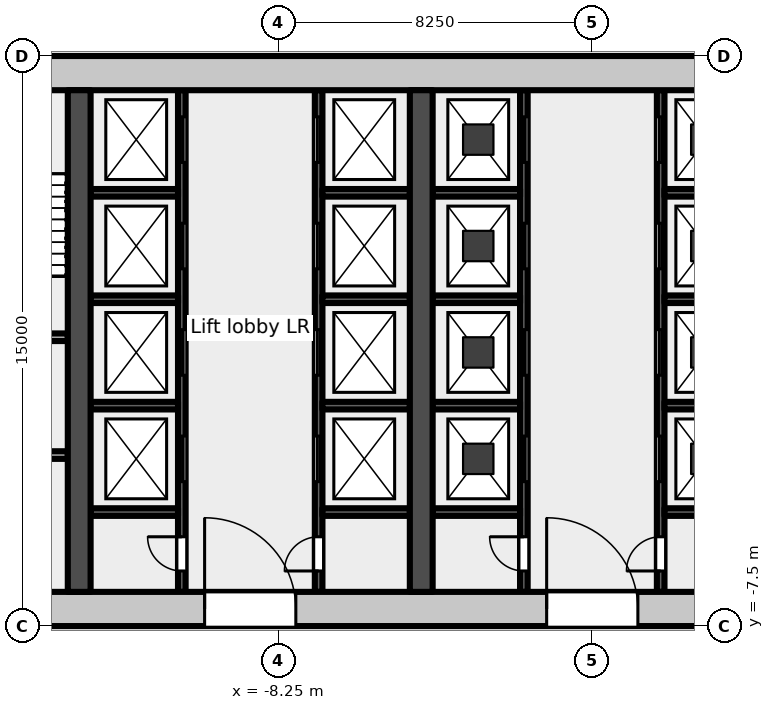
"""IFC4 building model, lengths in metres.
Left out: names, types, materials, properties, quantities, classifications, styles, units other than length and angle.
Written with IfcOpenShell. Run it as: python <this file> out.ifc"""

import sys

from ifc_helpers import new_model, si_unit, direction, frame, frame_2d, origin, place, context, subcontext, project, spatial, rectangle, extrude, element, fill, save


model = new_model("IFC4")
c1 = context("Model", 3, precision=1e-05, world=origin(), true_north=direction((0.0, 1.0)))
c2 = subcontext(c1, "Body", "Model", "MODEL_VIEW")
j1 = project(units=[si_unit("LENGTHUNIT", "METRE"), si_unit("PLANEANGLEUNIT", "RADIAN")], contexts=[c1])
p1 = place(None, origin())
s1 = spatial("IfcSite", under=j1, at=p1, CompositionType="ELEMENT")
p2 = place(p1, origin())
s2 = spatial("IfcBuilding", under=s1, at=p2, CompositionType="ELEMENT")
p3 = place(p2, origin())
s3 = spatial("IfcBuildingStorey", under=s2, at=p3, CompositionType="ELEMENT", Elevation=0.0)
p4 = place(p3, frame((-18.0, -7.05, -0.2), z_axis=(0.0, 0.0, 1.0), x_axis=(1.0, 0.0, 0.0)))
e1 = element("IfcWall", 1, at=p4, inside=s3, PredefinedType="SHEAR", context=c2, shape_type="SweptSolid", body=[
    extrude(rectangle(XDim=36.0, YDim=0.9, at=frame_2d((18.0, 0.0))), origin(), (0.0, 0.0, 1.0), 7.2),
])
p5 = place(p4, frame((7.8, 0.0, 0.2)))
e2 = element("IfcOpeningElement", 2, at=p5, cuts=e1, PredefinedType="OPENING", context=c2, shape_type="SweptSolid", body=[
    extrude(rectangle(XDim=2.4, YDim=2.1, at=frame_2d((1.2, 1.05))), frame((0.0, 0.46, 0.0), z_axis=(0.0, -1.0, 0.0), x_axis=(1.0, 0.0, 0.0)), (0.0, 0.0, 1.0), 0.921),
])
p6 = place(p4, frame((16.8, 0.0, 0.2)))
e3 = element("IfcOpeningElement", 3, at=p6, cuts=e1, PredefinedType="OPENING", context=c2, shape_type="SweptSolid", body=[
    extrude(rectangle(XDim=2.4, YDim=2.1, at=frame_2d((1.2, 1.05))), frame((0.0, 0.46, 0.0), z_axis=(0.0, -1.0, 0.0), x_axis=(1.0, 0.0, 0.0)), (0.0, 0.0, 1.0), 0.921),
])
p7 = place(p4, frame((26.1, 0.0, 0.2)))
e4 = element("IfcOpeningElement", 4, at=p7, cuts=e1, PredefinedType="OPENING", context=c2, shape_type="SweptSolid", body=[
    extrude(rectangle(XDim=2.4, YDim=2.1, at=frame_2d((1.2, 1.05))), frame((0.0, 0.46, 0.0), z_axis=(0.0, -1.0, 0.0), x_axis=(1.0, 0.0, 0.0)), (0.0, 0.0, 1.0), 0.921),
])
p8 = place(p3, frame((-18.0, 7.05, -0.2), z_axis=(0.0, 0.0, 1.0), x_axis=(1.0, 0.0, 0.0)))
e5 = element("IfcWall", 5, at=p8, inside=s3, PredefinedType="SHEAR", context=c2, shape_type="SweptSolid", body=[
    extrude(rectangle(XDim=36.0, YDim=0.9, at=frame_2d((18.0, 0.0))), origin(), (0.0, 0.0, 1.0), 7.2),
])
for number, where, z_axis, x_axis in (
    (6, (-13.5, -6.6, -0.2), (0.0, 0.0, 1.0), (0.0, 1.0, 0.0)),
    (7, (-4.5, -6.6, -0.2), (0.0, 0.0, 1.0), (0.0, 1.0, 0.0)),
):
    element("IfcWall", number, at=place(p3, frame(where, z_axis=z_axis, x_axis=x_axis)), inside=s3, PredefinedType="SHEAR", context=c2, shape_type="SweptSolid", body=[
        extrude(rectangle(XDim=13.2, YDim=0.6, at=frame_2d((6.6, 0.0))), origin(), (0.0, 0.0, 1.0), 7.2),
    ])
p9 = place(p3, frame((-17.1, -3.0, 0.0), z_axis=(0.0, 0.0, 1.0), x_axis=(1.0, 0.0, 0.0)))
e8 = element("IfcWall", 8, at=p9, inside=s3, PredefinedType="PARTITIONING", context=c2, shape_type="SweptSolid", body=[
    extrude(rectangle(XDim=3.3, YDim=0.2, at=frame_2d((1.65, 0.0))), origin(), (0.0, 0.0, 1.0), 7.0),
])
p10 = place(p9, frame((1.1, 0.0, 0.0)))
e9 = element("IfcOpeningElement", 9, at=p10, cuts=e8, PredefinedType="OPENING", context=c2, shape_type="SweptSolid", body=[
    extrude(rectangle(XDim=1.1, YDim=2.1, at=frame_2d((0.55, 1.05))), frame((0.0, 0.111, 0.0), z_axis=(0.0, -1.0, 0.0), x_axis=(1.0, 0.0, 0.0)), (0.0, 0.0, 1.0), 0.221),
])
p11 = place(p3, frame((-17.1, 0.1, 0.0), z_axis=(0.0, 0.0, 1.0), x_axis=(1.0, 0.0, 0.0)))
e10 = element("IfcWall", 10, at=p11, inside=s3, PredefinedType="PARTITIONING", context=c2, shape_type="SweptSolid", body=[
    extrude(rectangle(XDim=3.3, YDim=0.2, at=frame_2d((1.65, 0.0))), origin(), (0.0, 0.0, 1.0), 7.0),
])
p12 = place(p11, frame((1.1, 0.0, 0.0)))
e11 = element("IfcOpeningElement", 11, at=p12, cuts=e10, PredefinedType="OPENING", context=c2, shape_type="SweptSolid", body=[
    extrude(rectangle(XDim=1.1, YDim=2.1, at=frame_2d((0.55, 1.05))), frame((0.0, 0.111, 0.0), z_axis=(0.0, -1.0, 0.0), x_axis=(1.0, 0.0, 0.0)), (0.0, 0.0, 1.0), 0.221),
])
p13 = place(p3, frame((-10.8, -6.6, 0.0), z_axis=(0.0, 0.0, 1.0), x_axis=(0.0, 1.0, 0.0)))
e12 = element("IfcWall", 12, at=p13, inside=s3, PredefinedType="PARTITIONING", context=c2, shape_type="SweptSolid", body=[
    extrude(rectangle(XDim=13.2, YDim=0.2, at=frame_2d((6.6, 0.0))), origin(), (0.0, 0.0, 1.0), 7.0),
])
p14 = place(p13, frame((0.55, 0.0, 0.0)))
e13 = element("IfcOpeningElement", 13, at=p14, cuts=e12, PredefinedType="OPENING", context=c2, shape_type="SweptSolid", body=[
    extrude(rectangle(XDim=0.9, YDim=2.1, at=frame_2d((0.45, 1.05))), frame((0.0, 0.111, 0.0), z_axis=(0.0, -1.0, 0.0), x_axis=(1.0, 0.0, 0.0)), (0.0, 0.0, 1.0), 0.221),
])
p15 = place(p13, frame((2.9, 0.0, 0.0)))
e14 = element("IfcOpeningElement", 14, at=p15, cuts=e12, PredefinedType="OPENING", context=c2, shape_type="SweptSolid", body=[
    extrude(rectangle(XDim=1.2, YDim=2.1, at=frame_2d((0.6, 1.05))), frame((0.0, 0.111, 0.0), z_axis=(0.0, -1.0, 0.0), x_axis=(1.0, 0.0, 0.0)), (0.0, 0.0, 1.0), 0.221),
])
p16 = place(p13, frame((5.7, 0.0, 0.0)))
e15 = element("IfcOpeningElement", 15, at=p16, cuts=e12, PredefinedType="OPENING", context=c2, shape_type="SweptSolid", body=[
    extrude(rectangle(XDim=1.2, YDim=2.1, at=frame_2d((0.6, 1.05))), frame((0.0, 0.111, 0.0), z_axis=(0.0, -1.0, 0.0), x_axis=(1.0, 0.0, 0.0)), (0.0, 0.0, 1.0), 0.221),
])
p17 = place(p13, frame((8.5, 0.0, 0.0)))
e16 = element("IfcOpeningElement", 16, at=p17, cuts=e12, PredefinedType="OPENING", context=c2, shape_type="SweptSolid", body=[
    extrude(rectangle(XDim=1.2, YDim=2.1, at=frame_2d((0.6, 1.05))), frame((0.0, 0.111, 0.0), z_axis=(0.0, -1.0, 0.0), x_axis=(1.0, 0.0, 0.0)), (0.0, 0.0, 1.0), 0.221),
])
p18 = place(p13, frame((11.3, 0.0, 0.0)))
e17 = element("IfcOpeningElement", 17, at=p18, cuts=e12, PredefinedType="OPENING", context=c2, shape_type="SweptSolid", body=[
    extrude(rectangle(XDim=1.2, YDim=2.1, at=frame_2d((0.6, 1.05))), frame((0.0, 0.111, 0.0), z_axis=(0.0, -1.0, 0.0), x_axis=(1.0, 0.0, 0.0)), (0.0, 0.0, 1.0), 0.221),
])
p19 = place(p3, frame((-7.2, -6.6, 0.0), z_axis=(0.0, 0.0, 1.0), x_axis=(0.0, 1.0, 0.0)))
e18 = element("IfcWall", 18, at=p19, inside=s3, PredefinedType="PARTITIONING", context=c2, shape_type="SweptSolid", body=[
    extrude(rectangle(XDim=13.2, YDim=0.2, at=frame_2d((6.6, 0.0))), origin(), (0.0, 0.0, 1.0), 7.0),
])
p20 = place(p19, frame((0.55, 0.0, 0.0)))
e19 = element("IfcOpeningElement", 19, at=p20, cuts=e18, PredefinedType="OPENING", context=c2, shape_type="SweptSolid", body=[
    extrude(rectangle(XDim=0.9, YDim=2.1, at=frame_2d((0.45, 1.05))), frame((0.0, 0.111, 0.0), z_axis=(0.0, -1.0, 0.0), x_axis=(1.0, 0.0, 0.0)), (0.0, 0.0, 1.0), 0.221),
])
p21 = place(p19, frame((2.9, 0.0, 0.0)))
e20 = element("IfcOpeningElement", 20, at=p21, cuts=e18, PredefinedType="OPENING", context=c2, shape_type="SweptSolid", body=[
    extrude(rectangle(XDim=1.2, YDim=2.1, at=frame_2d((0.6, 1.05))), frame((0.0, 0.111, 0.0), z_axis=(0.0, -1.0, 0.0), x_axis=(1.0, 0.0, 0.0)), (0.0, 0.0, 1.0), 0.221),
])
p22 = place(p19, frame((5.7, 0.0, 0.0)))
e21 = element("IfcOpeningElement", 21, at=p22, cuts=e18, PredefinedType="OPENING", context=c2, shape_type="SweptSolid", body=[
    extrude(rectangle(XDim=1.2, YDim=2.1, at=frame_2d((0.6, 1.05))), frame((0.0, 0.111, 0.0), z_axis=(0.0, -1.0, 0.0), x_axis=(1.0, 0.0, 0.0)), (0.0, 0.0, 1.0), 0.221),
])
p23 = place(p19, frame((8.5, 0.0, 0.0)))
e22 = element("IfcOpeningElement", 22, at=p23, cuts=e18, PredefinedType="OPENING", context=c2, shape_type="SweptSolid", body=[
    extrude(rectangle(XDim=1.2, YDim=2.1, at=frame_2d((0.6, 1.05))), frame((0.0, 0.111, 0.0), z_axis=(0.0, -1.0, 0.0), x_axis=(1.0, 0.0, 0.0)), (0.0, 0.0, 1.0), 0.221),
])
p24 = place(p19, frame((11.3, 0.0, 0.0)))
e23 = element("IfcOpeningElement", 23, at=p24, cuts=e18, PredefinedType="OPENING", context=c2, shape_type="SweptSolid", body=[
    extrude(rectangle(XDim=1.2, YDim=2.1, at=frame_2d((0.6, 1.05))), frame((0.0, 0.111, 0.0), z_axis=(0.0, -1.0, 0.0), x_axis=(1.0, 0.0, 0.0)), (0.0, 0.0, 1.0), 0.221),
])
for number, where, z_axis, x_axis in (
    (24, (-13.2, -1.7, 0.0), (0.0, 0.0, 1.0), (1.0, 0.0, 0.0)),
    (25, (-13.2, 1.1, 0.0), (0.0, 0.0, 1.0), (1.0, 0.0, 0.0)),
    (26, (-13.2, 3.9, 0.0), (0.0, 0.0, 1.0), (1.0, 0.0, 0.0)),
    (27, (-13.2, -4.5, 0.0), (0.0, 0.0, 1.0), (1.0, 0.0, 0.0)),
    (28, (-7.1, -1.7, 0.0), (0.0, 0.0, 1.0), (1.0, 0.0, 0.0)),
    (29, (-7.1, 1.1, 0.0), (0.0, 0.0, 1.0), (1.0, 0.0, 0.0)),
    (30, (-7.1, 3.9, 0.0), (0.0, 0.0, 1.0), (1.0, 0.0, 0.0)),
    (31, (-7.1, -4.5, 0.0), (0.0, 0.0, 1.0), (1.0, 0.0, 0.0)),
):
    element("IfcWall", number, at=place(p3, frame(where, z_axis=z_axis, x_axis=x_axis)), inside=s3, PredefinedType="PARTITIONING", context=c2, shape_type="SweptSolid", body=[
        extrude(rectangle(XDim=2.3, YDim=0.2, at=frame_2d((1.15, 0.0))), origin(), (0.0, 0.0, 1.0), 7.0),
    ])
p25 = place(p3, frame((-1.8, -6.6, 0.0), z_axis=(0.0, 0.0, 1.0), x_axis=(0.0, 1.0, 0.0)))
e32 = element("IfcWall", 32, at=p25, inside=s3, PredefinedType="PARTITIONING", context=c2, shape_type="SweptSolid", body=[
    extrude(rectangle(XDim=13.2, YDim=0.2, at=frame_2d((6.6, 0.0))), origin(), (0.0, 0.0, 1.0), 7.0),
])
p26 = place(p25, frame((0.55, 0.0, 0.0)))
e33 = element("IfcOpeningElement", 33, at=p26, cuts=e32, PredefinedType="OPENING", context=c2, shape_type="SweptSolid", body=[
    extrude(rectangle(XDim=0.9, YDim=2.1, at=frame_2d((0.45, 1.05))), frame((0.0, 0.111, 0.0), z_axis=(0.0, -1.0, 0.0), x_axis=(1.0, 0.0, 0.0)), (0.0, 0.0, 1.0), 0.221),
])
p27 = place(p25, frame((2.9, 0.0, 0.0)))
e34 = element("IfcOpeningElement", 34, at=p27, cuts=e32, PredefinedType="OPENING", context=c2, shape_type="SweptSolid", body=[
    extrude(rectangle(XDim=1.2, YDim=2.1, at=frame_2d((0.6, 1.05))), frame((0.0, 0.111, 0.0), z_axis=(0.0, -1.0, 0.0), x_axis=(1.0, 0.0, 0.0)), (0.0, 0.0, 1.0), 0.221),
])
p28 = place(p25, frame((5.7, 0.0, 0.0)))
e35 = element("IfcOpeningElement", 35, at=p28, cuts=e32, PredefinedType="OPENING", context=c2, shape_type="SweptSolid", body=[
    extrude(rectangle(XDim=1.2, YDim=2.1, at=frame_2d((0.6, 1.05))), frame((0.0, 0.111, 0.0), z_axis=(0.0, -1.0, 0.0), x_axis=(1.0, 0.0, 0.0)), (0.0, 0.0, 1.0), 0.221),
])
p29 = place(p25, frame((8.5, 0.0, 0.0)))
e36 = element("IfcOpeningElement", 36, at=p29, cuts=e32, PredefinedType="OPENING", context=c2, shape_type="SweptSolid", body=[
    extrude(rectangle(XDim=1.2, YDim=2.1, at=frame_2d((0.6, 1.05))), frame((0.0, 0.111, 0.0), z_axis=(0.0, -1.0, 0.0), x_axis=(1.0, 0.0, 0.0)), (0.0, 0.0, 1.0), 0.221),
])
p30 = place(p25, frame((11.3, 0.0, 0.0)))
e37 = element("IfcOpeningElement", 37, at=p30, cuts=e32, PredefinedType="OPENING", context=c2, shape_type="SweptSolid", body=[
    extrude(rectangle(XDim=1.2, YDim=2.1, at=frame_2d((0.6, 1.05))), frame((0.0, 0.111, 0.0), z_axis=(0.0, -1.0, 0.0), x_axis=(1.0, 0.0, 0.0)), (0.0, 0.0, 1.0), 0.221),
])
p31 = place(p3, frame((1.8, -6.6, 0.0), z_axis=(0.0, 0.0, 1.0), x_axis=(0.0, 1.0, 0.0)))
e38 = element("IfcWall", 38, at=p31, inside=s3, PredefinedType="PARTITIONING", context=c2, shape_type="SweptSolid", body=[
    extrude(rectangle(XDim=13.2, YDim=0.2, at=frame_2d((6.6, 0.0))), origin(), (0.0, 0.0, 1.0), 7.0),
])
p32 = place(p31, frame((0.55, 0.0, 0.0)))
e39 = element("IfcOpeningElement", 39, at=p32, cuts=e38, PredefinedType="OPENING", context=c2, shape_type="SweptSolid", body=[
    extrude(rectangle(XDim=0.9, YDim=2.1, at=frame_2d((0.45, 1.05))), frame((0.0, 0.111, 0.0), z_axis=(0.0, -1.0, 0.0), x_axis=(1.0, 0.0, 0.0)), (0.0, 0.0, 1.0), 0.221),
])
p33 = place(p31, frame((2.9, 0.0, 0.0)))
e40 = element("IfcOpeningElement", 40, at=p33, cuts=e38, PredefinedType="OPENING", context=c2, shape_type="SweptSolid", body=[
    extrude(rectangle(XDim=1.2, YDim=2.1, at=frame_2d((0.6, 1.05))), frame((0.0, 0.111, 0.0), z_axis=(0.0, -1.0, 0.0), x_axis=(1.0, 0.0, 0.0)), (0.0, 0.0, 1.0), 0.221),
])
p34 = place(p31, frame((5.7, 0.0, 0.0)))
e41 = element("IfcOpeningElement", 41, at=p34, cuts=e38, PredefinedType="OPENING", context=c2, shape_type="SweptSolid", body=[
    extrude(rectangle(XDim=1.2, YDim=2.1, at=frame_2d((0.6, 1.05))), frame((0.0, 0.111, 0.0), z_axis=(0.0, -1.0, 0.0), x_axis=(1.0, 0.0, 0.0)), (0.0, 0.0, 1.0), 0.221),
])
p35 = place(p31, frame((8.5, 0.0, 0.0)))
e42 = element("IfcOpeningElement", 42, at=p35, cuts=e38, PredefinedType="OPENING", context=c2, shape_type="SweptSolid", body=[
    extrude(rectangle(XDim=1.2, YDim=2.1, at=frame_2d((0.6, 1.05))), frame((0.0, 0.111, 0.0), z_axis=(0.0, -1.0, 0.0), x_axis=(1.0, 0.0, 0.0)), (0.0, 0.0, 1.0), 0.221),
])
p36 = place(p31, frame((11.3, 0.0, 0.0)))
e43 = element("IfcOpeningElement", 43, at=p36, cuts=e38, PredefinedType="OPENING", context=c2, shape_type="SweptSolid", body=[
    extrude(rectangle(XDim=1.2, YDim=2.1, at=frame_2d((0.6, 1.05))), frame((0.0, 0.111, 0.0), z_axis=(0.0, -1.0, 0.0), x_axis=(1.0, 0.0, 0.0)), (0.0, 0.0, 1.0), 0.221),
])
for number, where, z_axis, x_axis in (
    (44, (-4.2, -1.7, 0.0), (0.0, 0.0, 1.0), (1.0, 0.0, 0.0)),
    (45, (-4.2, 1.1, 0.0), (0.0, 0.0, 1.0), (1.0, 0.0, 0.0)),
    (46, (-4.2, 3.9, 0.0), (0.0, 0.0, 1.0), (1.0, 0.0, 0.0)),
    (47, (-4.2, -4.5, 0.0), (0.0, 0.0, 1.0), (1.0, 0.0, 0.0)),
    (48, (1.9, -1.7, 0.0), (0.0, 0.0, 1.0), (1.0, 0.0, 0.0)),
    (49, (1.9, 1.1, 0.0), (0.0, 0.0, 1.0), (1.0, 0.0, 0.0)),
    (50, (1.9, 3.9, 0.0), (0.0, 0.0, 1.0), (1.0, 0.0, 0.0)),
    (51, (1.9, -4.5, 0.0), (0.0, 0.0, 1.0), (1.0, 0.0, 0.0)),
):
    element("IfcWall", number, at=place(p3, frame(where, z_axis=z_axis, x_axis=x_axis)), inside=s3, PredefinedType="PARTITIONING", context=c2, shape_type="SweptSolid", body=[
        extrude(rectangle(XDim=2.3, YDim=0.2, at=frame_2d((1.15, 0.0))), origin(), (0.0, 0.0, 1.0), 7.0),
    ])
p37 = place(p14, origin())
e52 = element("IfcDoor", 52, at=p37, inside=s3, OperationType="SINGLE_SWING_RIGHT", PredefinedType="DOOR", context=c2, shape_type="SweptSolid", body=[
    extrude(rectangle(XDim=0.9, YDim=2.1, at=frame_2d((0.45, 1.05))), frame((0.0, 0.025, 0.0), z_axis=(0.0, -1.0, 0.0), x_axis=(1.0, 0.0, 0.0)), (0.0, 0.0, 1.0), 0.05),
])
fill(e13, e52)
p38 = place(p15, origin())
e53 = element("IfcDoor", 53, at=p38, inside=s3, OperationType="DOUBLE_DOOR_SLIDING", PredefinedType="DOOR", context=c2, shape_type="SweptSolid", body=[
    extrude(rectangle(XDim=1.2, YDim=2.1, at=frame_2d((0.6, 1.05))), frame((0.0, 0.025, 0.0), z_axis=(0.0, -1.0, 0.0), x_axis=(1.0, 0.0, 0.0)), (0.0, 0.0, 1.0), 0.05),
])
fill(e14, e53)
p39 = place(p16, origin())
e54 = element("IfcDoor", 54, at=p39, inside=s3, OperationType="DOUBLE_DOOR_SLIDING", PredefinedType="DOOR", context=c2, shape_type="SweptSolid", body=[
    extrude(rectangle(XDim=1.2, YDim=2.1, at=frame_2d((0.6, 1.05))), frame((0.0, 0.025, 0.0), z_axis=(0.0, -1.0, 0.0), x_axis=(1.0, 0.0, 0.0)), (0.0, 0.0, 1.0), 0.05),
])
fill(e15, e54)
p40 = place(p17, origin())
e55 = element("IfcDoor", 55, at=p40, inside=s3, OperationType="DOUBLE_DOOR_SLIDING", PredefinedType="DOOR", context=c2, shape_type="SweptSolid", body=[
    extrude(rectangle(XDim=1.2, YDim=2.1, at=frame_2d((0.6, 1.05))), frame((0.0, 0.025, 0.0), z_axis=(0.0, -1.0, 0.0), x_axis=(1.0, 0.0, 0.0)), (0.0, 0.0, 1.0), 0.05),
])
fill(e16, e55)
p41 = place(p18, origin())
e56 = element("IfcDoor", 56, at=p41, inside=s3, OperationType="DOUBLE_DOOR_SLIDING", PredefinedType="DOOR", context=c2, shape_type="SweptSolid", body=[
    extrude(rectangle(XDim=1.2, YDim=2.1, at=frame_2d((0.6, 1.05))), frame((0.0, 0.025, 0.0), z_axis=(0.0, -1.0, 0.0), x_axis=(1.0, 0.0, 0.0)), (0.0, 0.0, 1.0), 0.05),
])
fill(e17, e56)
p42 = place(p20, origin())
e57 = element("IfcDoor", 57, at=p42, inside=s3, OperationType="SINGLE_SWING_LEFT", PredefinedType="DOOR", context=c2, shape_type="SweptSolid", body=[
    extrude(rectangle(XDim=0.9, YDim=2.1, at=frame_2d((0.45, 1.05))), frame((0.0, 0.025, 0.0), z_axis=(0.0, -1.0, 0.0), x_axis=(1.0, 0.0, 0.0)), (0.0, 0.0, 1.0), 0.05),
])
fill(e19, e57)
p43 = place(p21, origin())
e58 = element("IfcDoor", 58, at=p43, inside=s3, OperationType="DOUBLE_DOOR_SLIDING", PredefinedType="DOOR", context=c2, shape_type="SweptSolid", body=[
    extrude(rectangle(XDim=1.2, YDim=2.1, at=frame_2d((0.6, 1.05))), frame((0.0, 0.025, 0.0), z_axis=(0.0, -1.0, 0.0), x_axis=(1.0, 0.0, 0.0)), (0.0, 0.0, 1.0), 0.05),
])
fill(e20, e58)
p44 = place(p22, origin())
e59 = element("IfcDoor", 59, at=p44, inside=s3, OperationType="DOUBLE_DOOR_SLIDING", PredefinedType="DOOR", context=c2, shape_type="SweptSolid", body=[
    extrude(rectangle(XDim=1.2, YDim=2.1, at=frame_2d((0.6, 1.05))), frame((0.0, 0.025, 0.0), z_axis=(0.0, -1.0, 0.0), x_axis=(1.0, 0.0, 0.0)), (0.0, 0.0, 1.0), 0.05),
])
fill(e21, e59)
p45 = place(p23, origin())
e60 = element("IfcDoor", 60, at=p45, inside=s3, OperationType="DOUBLE_DOOR_SLIDING", PredefinedType="DOOR", context=c2, shape_type="SweptSolid", body=[
    extrude(rectangle(XDim=1.2, YDim=2.1, at=frame_2d((0.6, 1.05))), frame((0.0, 0.025, 0.0), z_axis=(0.0, -1.0, 0.0), x_axis=(1.0, 0.0, 0.0)), (0.0, 0.0, 1.0), 0.05),
])
fill(e22, e60)
p46 = place(p24, origin())
e61 = element("IfcDoor", 61, at=p46, inside=s3, OperationType="DOUBLE_DOOR_SLIDING", PredefinedType="DOOR", context=c2, shape_type="SweptSolid", body=[
    extrude(rectangle(XDim=1.2, YDim=2.1, at=frame_2d((0.6, 1.05))), frame((0.0, 0.025, 0.0), z_axis=(0.0, -1.0, 0.0), x_axis=(1.0, 0.0, 0.0)), (0.0, 0.0, 1.0), 0.05),
])
fill(e23, e61)
p47 = place(p5, origin())
e62 = element("IfcDoor", 62, at=p47, inside=s3, OperationType="DOUBLE_DOOR_DOUBLE_SWING", PredefinedType="DOOR", context=c2, shape_type="SweptSolid", body=[
    extrude(rectangle(XDim=2.4, YDim=2.1, at=frame_2d((1.2, 1.05))), frame((0.0, 0.025, 0.0), z_axis=(0.0, -1.0, 0.0), x_axis=(1.0, 0.0, 0.0)), (0.0, 0.0, 1.0), 0.05),
])
fill(e2, e62)
p48 = place(p26, origin())
e63 = element("IfcDoor", 63, at=p48, inside=s3, OperationType="SINGLE_SWING_RIGHT", PredefinedType="DOOR", context=c2, shape_type="SweptSolid", body=[
    extrude(rectangle(XDim=0.9, YDim=2.1, at=frame_2d((0.45, 1.05))), frame((0.0, 0.025, 0.0), z_axis=(0.0, -1.0, 0.0), x_axis=(1.0, 0.0, 0.0)), (0.0, 0.0, 1.0), 0.05),
])
fill(e33, e63)
p49 = place(p27, origin())
e64 = element("IfcDoor", 64, at=p49, inside=s3, OperationType="DOUBLE_DOOR_SLIDING", PredefinedType="DOOR", context=c2, shape_type="SweptSolid", body=[
    extrude(rectangle(XDim=1.2, YDim=2.1, at=frame_2d((0.6, 1.05))), frame((0.0, 0.025, 0.0), z_axis=(0.0, -1.0, 0.0), x_axis=(1.0, 0.0, 0.0)), (0.0, 0.0, 1.0), 0.05),
])
fill(e34, e64)
p50 = place(p28, origin())
e65 = element("IfcDoor", 65, at=p50, inside=s3, OperationType="DOUBLE_DOOR_SLIDING", PredefinedType="DOOR", context=c2, shape_type="SweptSolid", body=[
    extrude(rectangle(XDim=1.2, YDim=2.1, at=frame_2d((0.6, 1.05))), frame((0.0, 0.025, 0.0), z_axis=(0.0, -1.0, 0.0), x_axis=(1.0, 0.0, 0.0)), (0.0, 0.0, 1.0), 0.05),
])
fill(e35, e65)
p51 = place(p29, origin())
e66 = element("IfcDoor", 66, at=p51, inside=s3, OperationType="DOUBLE_DOOR_SLIDING", PredefinedType="DOOR", context=c2, shape_type="SweptSolid", body=[
    extrude(rectangle(XDim=1.2, YDim=2.1, at=frame_2d((0.6, 1.05))), frame((0.0, 0.025, 0.0), z_axis=(0.0, -1.0, 0.0), x_axis=(1.0, 0.0, 0.0)), (0.0, 0.0, 1.0), 0.05),
])
fill(e36, e66)
p52 = place(p30, origin())
e67 = element("IfcDoor", 67, at=p52, inside=s3, OperationType="DOUBLE_DOOR_SLIDING", PredefinedType="DOOR", context=c2, shape_type="SweptSolid", body=[
    extrude(rectangle(XDim=1.2, YDim=2.1, at=frame_2d((0.6, 1.05))), frame((0.0, 0.025, 0.0), z_axis=(0.0, -1.0, 0.0), x_axis=(1.0, 0.0, 0.0)), (0.0, 0.0, 1.0), 0.05),
])
fill(e37, e67)
p53 = place(p32, origin())
e68 = element("IfcDoor", 68, at=p53, inside=s3, OperationType="SINGLE_SWING_LEFT", PredefinedType="DOOR", context=c2, shape_type="SweptSolid", body=[
    extrude(rectangle(XDim=0.9, YDim=2.1, at=frame_2d((0.45, 1.05))), frame((0.0, 0.025, 0.0), z_axis=(0.0, -1.0, 0.0), x_axis=(1.0, 0.0, 0.0)), (0.0, 0.0, 1.0), 0.05),
])
fill(e39, e68)
p54 = place(p33, origin())
e69 = element("IfcDoor", 69, at=p54, inside=s3, OperationType="DOUBLE_DOOR_SLIDING", PredefinedType="DOOR", context=c2, shape_type="SweptSolid", body=[
    extrude(rectangle(XDim=1.2, YDim=2.1, at=frame_2d((0.6, 1.05))), frame((0.0, 0.025, 0.0), z_axis=(0.0, -1.0, 0.0), x_axis=(1.0, 0.0, 0.0)), (0.0, 0.0, 1.0), 0.05),
])
fill(e40, e69)
p55 = place(p34, origin())
e70 = element("IfcDoor", 70, at=p55, inside=s3, OperationType="DOUBLE_DOOR_SLIDING", PredefinedType="DOOR", context=c2, shape_type="SweptSolid", body=[
    extrude(rectangle(XDim=1.2, YDim=2.1, at=frame_2d((0.6, 1.05))), frame((0.0, 0.025, 0.0), z_axis=(0.0, -1.0, 0.0), x_axis=(1.0, 0.0, 0.0)), (0.0, 0.0, 1.0), 0.05),
])
fill(e41, e70)
p56 = place(p35, origin())
e71 = element("IfcDoor", 71, at=p56, inside=s3, OperationType="DOUBLE_DOOR_SLIDING", PredefinedType="DOOR", context=c2, shape_type="SweptSolid", body=[
    extrude(rectangle(XDim=1.2, YDim=2.1, at=frame_2d((0.6, 1.05))), frame((0.0, 0.025, 0.0), z_axis=(0.0, -1.0, 0.0), x_axis=(1.0, 0.0, 0.0)), (0.0, 0.0, 1.0), 0.05),
])
fill(e42, e71)
p57 = place(p36, origin())
e72 = element("IfcDoor", 72, at=p57, inside=s3, OperationType="DOUBLE_DOOR_SLIDING", PredefinedType="DOOR", context=c2, shape_type="SweptSolid", body=[
    extrude(rectangle(XDim=1.2, YDim=2.1, at=frame_2d((0.6, 1.05))), frame((0.0, 0.025, 0.0), z_axis=(0.0, -1.0, 0.0), x_axis=(1.0, 0.0, 0.0)), (0.0, 0.0, 1.0), 0.05),
])
fill(e43, e72)
p58 = place(p6, origin())
e73 = element("IfcDoor", 73, at=p58, inside=s3, OperationType="DOUBLE_DOOR_DOUBLE_SWING", PredefinedType="DOOR", context=c2, shape_type="SweptSolid", body=[
    extrude(rectangle(XDim=2.4, YDim=2.1, at=frame_2d((1.2, 1.05))), frame((0.0, 0.025, 0.0), z_axis=(0.0, -1.0, 0.0), x_axis=(1.0, 0.0, 0.0)), (0.0, 0.0, 1.0), 0.05),
])
fill(e3, e73)
save(model, sys.argv[1])
